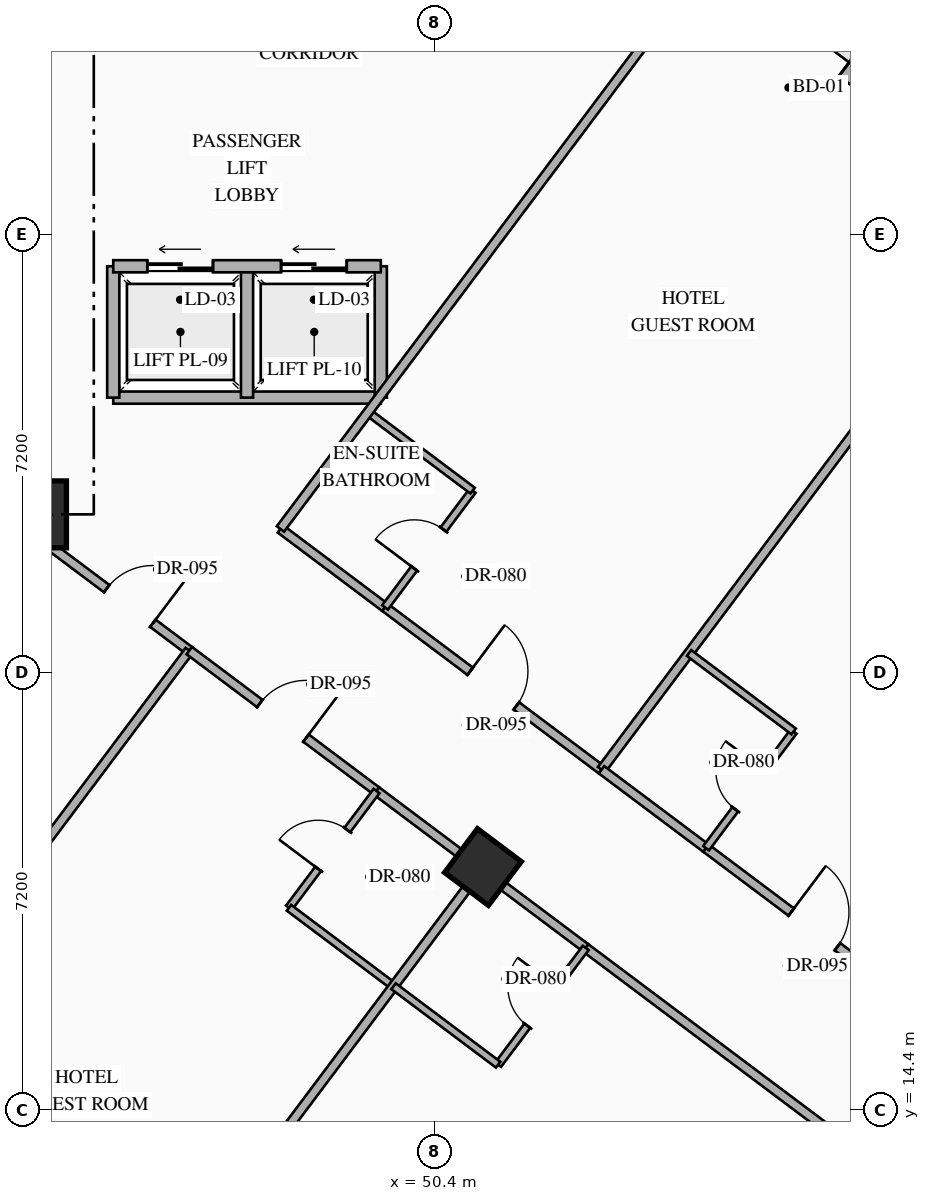
"""IFC4 building model, lengths in metres.
Left out: names, types, materials, properties, quantities, classifications, styles, units other than length and angle.
Written with IfcOpenShell. Run it as: python <this file> out.ifc"""

import sys

from ifc_helpers import new_model, si_unit, direction, frame, frame_2d, origin, origin_2d, place, context, subcontext, project, spatial, rectangle, hollow_rectangle, extrude, element, fill, save


model = new_model("IFC4")
c1 = context("Model", 3, precision=1e-05, world=origin(), true_north=direction((0.0, 1.0)))
c2 = subcontext(c1, "Body", "Model", "MODEL_VIEW")
j1 = project(units=[si_unit("LENGTHUNIT", "METRE"), si_unit("PLANEANGLEUNIT", "RADIAN")], contexts=[c1])
p1 = place(None, origin())
s1 = spatial("IfcSite", under=j1, at=p1, CompositionType="ELEMENT")
p2 = place(p1, origin())
s2 = spatial("IfcBuilding", under=s1, at=p2, CompositionType="ELEMENT")
p3 = place(p2, frame((0.0, 0.0, 84.65)))
s3 = spatial("IfcBuildingStorey", under=s2, at=p3, CompositionType="ELEMENT", Elevation=84.65)
p4 = place(p3, frame((43.8, 24.2, 0.0), z_axis=(0.0, 0.0, 1.0), x_axis=(1.0, 0.0, 0.0)))
e1 = element("IfcColumn", 1, at=p4, inside=s3, PredefinedType="COLUMN", context=c2, shape_type="SweptSolid", body=[
    extrude(rectangle(XDim=1.1, YDim=1.1, at=origin_2d()), origin(), (0.0, 0.0, 1.0), 3.35),
])
p5 = place(p3, frame((51.2, 18.4, 0.0), z_axis=(0.0, 0.0, 1.0), x_axis=(0.799999996291, -0.600000004945, 0.0)))
e2 = element("IfcColumn", 2, at=p5, inside=s3, PredefinedType="COLUMN", context=c2, shape_type="SweptSolid", body=[
    extrude(hollow_rectangle(XDim=0.9, YDim=0.9, WallThickness=0.036, at=origin_2d()), origin(), (0.0, 0.0, 1.0), 3.35),
])
p6 = place(p3, frame((44.86, 40.73, 0.0), z_axis=(0.0, 0.0, 1.0), x_axis=(0.800006902154, -0.599990797017, 0.0)))
e3 = element("IfcWall", 3, at=p6, inside=s3, PredefinedType="STANDARD", context=c2, shape_type="SweptSolid", body=[
    extrude(rectangle(XDim=29.712, YDim=0.28, at=frame_2d((14.856, 0.0))), origin(), (0.0, 0.0, 1.0), 3.13),
])
p7 = place(p6, frame((14.249, 0.0, 0.0)))
e4 = element("IfcOpeningElement", 4, at=p7, cuts=e3, PredefinedType="OPENING", context=c2, shape_type="SweptSolid", body=[
    extrude(rectangle(XDim=1.1, YDim=2.2, at=frame_2d((0.55, 1.1))), frame((0.0, 0.15, 0.0), z_axis=(0.0, -1.0, 0.0), x_axis=(1.0, 0.0, 0.0)), (0.0, 0.0, 1.0), 0.3),
])
p8 = place(p6, frame((1.612, 0.0, 0.85)))
e5 = element("IfcOpeningElement", 5, at=p8, cuts=e3, PredefinedType="OPENING", context=c2, shape_type="SweptSolid", body=[
    extrude(rectangle(XDim=1.4, YDim=1.8, at=frame_2d((0.7, 0.9))), frame((0.0, 0.15, 0.0), z_axis=(0.0, -1.0, 0.0), x_axis=(1.0, 0.0, 0.0)), (0.0, 0.0, 1.0), 0.3),
])
p9 = place(p6, frame((5.667, 0.0, 0.85)))
e6 = element("IfcOpeningElement", 6, at=p9, cuts=e3, PredefinedType="OPENING", context=c2, shape_type="SweptSolid", body=[
    extrude(rectangle(XDim=1.4, YDim=1.8, at=frame_2d((0.7, 0.9))), frame((0.0, 0.15, 0.0), z_axis=(0.0, -1.0, 0.0), x_axis=(1.0, 0.0, 0.0)), (0.0, 0.0, 1.0), 0.3),
])
p10 = place(p6, frame((9.912, 0.0, 0.85)))
e7 = element("IfcOpeningElement", 7, at=p10, cuts=e3, PredefinedType="OPENING", context=c2, shape_type="SweptSolid", body=[
    extrude(rectangle(XDim=1.4, YDim=1.8, at=frame_2d((0.7, 0.9))), frame((0.0, 0.15, 0.0), z_axis=(0.0, -1.0, 0.0), x_axis=(1.0, 0.0, 0.0)), (0.0, 0.0, 1.0), 0.3),
])
p11 = place(p6, frame((19.743, 0.0, 0.85)))
e8 = element("IfcOpeningElement", 8, at=p11, cuts=e3, PredefinedType="OPENING", context=c2, shape_type="SweptSolid", body=[
    extrude(rectangle(XDim=1.4, YDim=1.8, at=frame_2d((0.7, 0.9))), frame((0.0, 0.15, 0.0), z_axis=(0.0, -1.0, 0.0), x_axis=(1.0, 0.0, 0.0)), (0.0, 0.0, 1.0), 0.3),
])
p12 = place(p6, frame((22.645, 0.0, 0.85)))
e9 = element("IfcOpeningElement", 9, at=p12, cuts=e3, PredefinedType="OPENING", context=c2, shape_type="SweptSolid", body=[
    extrude(rectangle(XDim=1.4, YDim=1.8, at=frame_2d((0.7, 0.9))), frame((0.0, 0.15, 0.0), z_axis=(0.0, -1.0, 0.0), x_axis=(1.0, 0.0, 0.0)), (0.0, 0.0, 1.0), 0.3),
])
p13 = place(p6, frame((26.7, 0.0, 0.85)))
e10 = element("IfcOpeningElement", 10, at=p13, cuts=e3, PredefinedType="OPENING", context=c2, shape_type="SweptSolid", body=[
    extrude(rectangle(XDim=1.4, YDim=1.8, at=frame_2d((0.7, 0.9))), frame((0.0, 0.15, 0.0), z_axis=(0.0, -1.0, 0.0), x_axis=(1.0, 0.0, 0.0)), (0.0, 0.0, 1.0), 0.3),
])
p14 = place(p3, frame((45.12, 26.12, 0.0), z_axis=(0.0, 0.0, 1.0), x_axis=(1.0, 0.0, 0.0)))
e11 = element("IfcWall", 11, at=p14, inside=s3, PredefinedType="STANDARD", context=c2, shape_type="SweptSolid", body=[
    extrude(rectangle(XDim=4.4, YDim=0.2, at=frame_2d((2.2, 0.0))), origin(), (0.0, 0.0, 1.0), 3.13),
])
for number, where, z_axis, x_axis in (
    (12, (45.12, 26.12, 0.0), (0.0, 0.0, 1.0), (0.0, 1.0, 0.0)),
    (13, (49.52, 26.12, 0.0), (0.0, 0.0, 1.0), (0.0, 1.0, 0.0)),
    (14, (47.32, 26.12, 0.0), (0.0, 0.0, 1.0), (0.0, 1.0, 0.0)),
):
    element("IfcWall", number, at=place(p3, frame(where, z_axis=z_axis, x_axis=x_axis)), inside=s3, PredefinedType="STANDARD", context=c2, shape_type="SweptSolid", body=[
        extrude(rectangle(XDim=2.16, YDim=0.2, at=frame_2d((1.08, 0.0))), origin(), (0.0, 0.0, 1.0), 3.13),
    ])
p15 = place(p3, frame((45.12, 28.28, 0.0), z_axis=(0.0, 0.0, 1.0), x_axis=(1.0, 0.0, 0.0)))
e15 = element("IfcWall", 15, at=p15, inside=s3, PredefinedType="STANDARD", context=c2, shape_type="SweptSolid", body=[
    extrude(rectangle(XDim=4.4, YDim=0.2, at=frame_2d((2.2, 0.0))), origin(), (0.0, 0.0, 1.0), 3.13),
])
p16 = place(p15, frame((0.56, 0.0, 0.0)))
e16 = element("IfcOpeningElement", 16, at=p16, cuts=e15, PredefinedType="OPENING", context=c2, shape_type="SweptSolid", body=[
    extrude(rectangle(XDim=1.08, YDim=2.15, at=frame_2d((0.54, 1.075))), frame((0.0, 0.11, 0.0), z_axis=(0.0, -1.0, 0.0), x_axis=(1.0, 0.0, 0.0)), (0.0, 0.0, 1.0), 0.22),
])
p17 = place(p15, frame((2.76, 0.0, 0.0)))
e17 = element("IfcOpeningElement", 17, at=p17, cuts=e15, PredefinedType="OPENING", context=c2, shape_type="SweptSolid", body=[
    extrude(rectangle(XDim=1.08, YDim=2.15, at=frame_2d((0.54, 1.075))), frame((0.0, 0.11, 0.0), z_axis=(0.0, -1.0, 0.0), x_axis=(1.0, 0.0, 0.0)), (0.0, 0.0, 1.0), 0.22),
])
p18 = place(p3, frame((43.037, 24.46, 0.0), z_axis=(0.0, 0.0, 1.0), x_axis=(0.799971872363, -0.600037501685, 0.0)))
e18 = element("IfcWall", 18, at=p18, inside=s3, PredefinedType="PARTITIONING", context=c2, shape_type="SweptSolid", body=[
    extrude(rectangle(XDim=4.167, YDim=0.15, at=frame_2d((2.083, 0.0))), origin(), (0.0, 0.0, 1.0), 2.425),
])
p19 = place(p18, frame((2.468, 0.0, 0.0)))
e19 = element("IfcOpeningElement", 19, at=p19, cuts=e18, PredefinedType="OPENING", context=c2, shape_type="SweptSolid", body=[
    extrude(rectangle(XDim=0.95, YDim=2.15, at=frame_2d((0.475, 1.075))), frame((0.0, 0.085, 0.0), z_axis=(0.0, -1.0, 0.0), x_axis=(1.0, 0.0, 0.0)), (0.0, 0.0, 1.0), 0.17),
])
p20 = place(p3, frame((39.464, 12.752, 0.0), z_axis=(0.0, 0.0, 1.0), x_axis=(0.6, 0.8, 0.0)))
e20 = element("IfcWall", 20, at=p20, inside=s3, PredefinedType="PARTITIONING", context=c2, shape_type="SweptSolid", body=[
    extrude(rectangle(XDim=11.51, YDim=0.15, at=frame_2d((5.755, 0.0))), origin(), (0.0, 0.0, 1.0), 3.13),
])
p21 = place(p3, frame((47.87, 23.96, 0.0), z_axis=(0.0, 0.0, 1.0), x_axis=(0.79998637334, -0.60001816845, 0.0)))
e21 = element("IfcWall", 21, at=p21, inside=s3, PredefinedType="PARTITIONING", context=c2, shape_type="SweptSolid", body=[
    extrude(rectangle(XDim=2.15, YDim=0.15, at=frame_2d((1.075, 0.0))), origin(), (0.0, 0.0, 1.0), 2.775),
])
p22 = place(p3, frame((49.59, 22.67, 0.0), z_axis=(0.0, 0.0, 1.0), x_axis=(0.799993416095, -0.600008778439, 0.0)))
e22 = element("IfcWall", 22, at=p22, inside=s3, PredefinedType="PARTITIONING", context=c2, shape_type="SweptSolid", body=[
    extrude(rectangle(XDim=4.45, YDim=0.15, at=frame_2d((2.225, 0.0))), origin(), (0.0, 0.0, 1.0), 2.775),
])
p23 = place(p22, frame((1.75, 0.0, 0.0)))
e23 = element("IfcOpeningElement", 23, at=p23, cuts=e22, PredefinedType="OPENING", context=c2, shape_type="SweptSolid", body=[
    extrude(rectangle(XDim=0.95, YDim=2.15, at=frame_2d((0.475, 1.075))), frame((0.0, 0.085, 0.0), z_axis=(0.0, -1.0, 0.0), x_axis=(1.0, 0.0, 0.0)), (0.0, 0.0, 1.0), 0.17),
])
p24 = place(p3, frame((49.59, 22.67, 0.0), z_axis=(0.0, 0.0, 1.0), x_axis=(0.599951172744, 0.800036618114, 0.0)))
e24 = element("IfcWall", 24, at=p24, inside=s3, PredefinedType="PARTITIONING", context=c2, shape_type="SweptSolid", body=[
    extrude(rectangle(XDim=2.4, YDim=0.12, at=frame_2d((1.2, 0.0))), origin(), (0.0, 0.0, 1.0), 3.13),
])
p25 = place(p24, frame((0.8, 0.0, 0.0)))
e25 = element("IfcOpeningElement", 25, at=p25, cuts=e24, PredefinedType="OPENING", context=c2, shape_type="SweptSolid", body=[
    extrude(rectangle(XDim=0.8, YDim=2.06, at=frame_2d((0.4, 1.03))), frame((0.0, 0.07, 0.0), z_axis=(0.0, -1.0, 0.0), x_axis=(1.0, 0.0, 0.0)), (0.0, 0.0, 1.0), 0.14),
])
p26 = place(p3, frame((49.31, 25.88, 0.0), z_axis=(0.0, 0.0, 1.0), x_axis=(0.800040880289, -0.59994548908, 0.0)))
e26 = element("IfcWall", 26, at=p26, inside=s3, PredefinedType="PARTITIONING", context=c2, shape_type="SweptSolid", body=[
    extrude(rectangle(XDim=2.15, YDim=0.12, at=frame_2d((1.075, 0.0))), origin(), (0.0, 0.0, 1.0), 3.13),
])
for number, where, z_axis, x_axis in (
    (27, (47.87, 23.96, 0.0), (0.0, 0.0, 1.0), (0.6, 0.8, 0.0)),
    (28, (53.15, 20.0, 0.0), (0.0, 0.0, 1.0), (0.6, 0.8, 0.0)),
):
    element("IfcWall", number, at=place(p3, frame(where, z_axis=z_axis, x_axis=x_axis)), inside=s3, PredefinedType="PARTITIONING", context=c2, shape_type="SweptSolid", body=[
        extrude(rectangle(XDim=11.55, YDim=0.15, at=frame_2d((5.775, 0.0))), origin(), (0.0, 0.0, 1.0), 3.13),
    ])
p27 = place(p3, frame((53.15, 20.0, 0.0), z_axis=(0.0, 0.0, 1.0), x_axis=(0.800027249606, -0.599963665473, 0.0)))
e29 = element("IfcWall", 29, at=p27, inside=s3, PredefinedType="PARTITIONING", context=c2, shape_type="SweptSolid", body=[
    extrude(rectangle(XDim=2.15, YDim=0.15, at=frame_2d((1.075, 0.0))), origin(), (0.0, 0.0, 1.0), 2.775),
])
p28 = place(p3, frame((54.87, 18.71, 0.0), z_axis=(0.0, 0.0, 1.0), x_axis=(0.799993416095, -0.600008778439, 0.0)))
e30 = element("IfcWall", 30, at=p28, inside=s3, PredefinedType="PARTITIONING", context=c2, shape_type="SweptSolid", body=[
    extrude(rectangle(XDim=4.45, YDim=0.15, at=frame_2d((2.225, 0.0))), origin(), (0.0, 0.0, 1.0), 2.775),
])
p29 = place(p28, frame((1.75, 0.0, 0.0)))
e31 = element("IfcOpeningElement", 31, at=p29, cuts=e30, PredefinedType="OPENING", context=c2, shape_type="SweptSolid", body=[
    extrude(rectangle(XDim=0.95, YDim=2.15, at=frame_2d((0.475, 1.075))), frame((0.0, 0.085, 0.0), z_axis=(0.0, -1.0, 0.0), x_axis=(1.0, 0.0, 0.0)), (0.0, 0.0, 1.0), 0.17),
])
p30 = place(p3, frame((54.87, 18.71, 0.0), z_axis=(0.0, 0.0, 1.0), x_axis=(0.6, 0.8, 0.0)))
e32 = element("IfcWall", 32, at=p30, inside=s3, PredefinedType="PARTITIONING", context=c2, shape_type="SweptSolid", body=[
    extrude(rectangle(XDim=2.4, YDim=0.12, at=frame_2d((1.2, 0.0))), origin(), (0.0, 0.0, 1.0), 3.13),
])
p31 = place(p30, frame((0.8, 0.0, 0.0)))
e33 = element("IfcOpeningElement", 33, at=p31, cuts=e32, PredefinedType="OPENING", context=c2, shape_type="SweptSolid", body=[
    extrude(rectangle(XDim=0.8, YDim=2.06, at=frame_2d((0.4, 1.03))), frame((0.0, 0.07, 0.0), z_axis=(0.0, -1.0, 0.0), x_axis=(1.0, 0.0, 0.0)), (0.0, 0.0, 1.0), 0.14),
])
p32 = place(p3, frame((54.59, 21.92, 0.0), z_axis=(0.0, 0.0, 1.0), x_axis=(0.79998637334, -0.60001816845, 0.0)))
e34 = element("IfcWall", 34, at=p32, inside=s3, PredefinedType="PARTITIONING", context=c2, shape_type="SweptSolid", body=[
    extrude(rectangle(XDim=2.15, YDim=0.12, at=frame_2d((1.075, 0.0))), origin(), (0.0, 0.0, 1.0), 3.13),
])
p33 = place(p3, frame((46.37, 21.96, 0.0), z_axis=(0.0, 0.0, 1.0), x_axis=(0.799977170108, -0.600030438649, 0.0)))
e35 = element("IfcWall", 35, at=p33, inside=s3, PredefinedType="PARTITIONING", context=c2, shape_type="SweptSolid", body=[
    extrude(rectangle(XDim=3.85, YDim=0.15, at=frame_2d((1.925, 0.0))), origin(), (0.0, 0.0, 1.0), 2.425),
])
p34 = place(p33, frame((1.45, 0.0, 0.0)))
e36 = element("IfcOpeningElement", 36, at=p34, cuts=e35, PredefinedType="OPENING", context=c2, shape_type="SweptSolid", body=[
    extrude(rectangle(XDim=0.95, YDim=2.15, at=frame_2d((0.475, 1.075))), frame((0.0, 0.085, 0.0), z_axis=(0.0, -1.0, 0.0), x_axis=(1.0, 0.0, 0.0)), (0.0, 0.0, 1.0), 0.17),
])
p35 = place(p3, frame((49.45, 19.65, 0.0), z_axis=(0.0, 0.0, 1.0), x_axis=(0.800040880289, -0.59994548908, 0.0)))
e37 = element("IfcWall", 37, at=p35, inside=s3, PredefinedType="PARTITIONING", context=c2, shape_type="SweptSolid", body=[
    extrude(rectangle(XDim=2.15, YDim=0.15, at=frame_2d((1.075, 0.0))), origin(), (0.0, 0.0, 1.0), 2.425),
])
p36 = place(p3, frame((48.01, 17.73, 0.0), z_axis=(0.0, 0.0, 1.0), x_axis=(0.6, 0.8, 0.0)))
e38 = element("IfcWall", 38, at=p36, inside=s3, PredefinedType="PARTITIONING", context=c2, shape_type="SweptSolid", body=[
    extrude(rectangle(XDim=2.4, YDim=0.12, at=frame_2d((1.2, 0.0))), origin(), (0.0, 0.0, 1.0), 3.13),
])
p37 = place(p36, frame((0.8, 0.0, 0.0)))
e39 = element("IfcOpeningElement", 39, at=p37, cuts=e38, PredefinedType="OPENING", context=c2, shape_type="SweptSolid", body=[
    extrude(rectangle(XDim=0.8, YDim=2.06, at=frame_2d((0.4, 1.03))), frame((0.0, 0.07, 0.0), z_axis=(0.0, -1.0, 0.0), x_axis=(1.0, 0.0, 0.0)), (0.0, 0.0, 1.0), 0.14),
])
p38 = place(p3, frame((48.01, 17.73, 0.0), z_axis=(0.0, 0.0, 1.0), x_axis=(0.79998637334, -0.60001816845, 0.0)))
e40 = element("IfcWall", 40, at=p38, inside=s3, PredefinedType="PARTITIONING", context=c2, shape_type="SweptSolid", body=[
    extrude(rectangle(XDim=2.15, YDim=0.12, at=frame_2d((1.075, 0.0))), origin(), (0.0, 0.0, 1.0), 3.13),
])
p39 = place(p3, frame((44.36, 9.28, 0.0), z_axis=(0.0, 0.0, 1.0), x_axis=(0.599986233332, 0.800010324816, 0.0)))
e41 = element("IfcWall", 41, at=p39, inside=s3, PredefinedType="PARTITIONING", context=c2, shape_type="SweptSolid", body=[
    extrude(rectangle(XDim=11.35, YDim=0.15, at=frame_2d((5.675, 0.0))), origin(), (0.0, 0.0, 1.0), 2.425),
])
p40 = place(p3, frame((51.17, 18.36, 0.0), z_axis=(0.0, 0.0, 1.0), x_axis=(0.79998637334, -0.60001816845, 0.0)))
e42 = element("IfcWall", 42, at=p40, inside=s3, PredefinedType="PARTITIONING", context=c2, shape_type="SweptSolid", body=[
    extrude(rectangle(XDim=2.15, YDim=0.15, at=frame_2d((1.075, 0.0))), origin(), (0.0, 0.0, 1.0), 2.425),
])
p41 = place(p3, frame((52.89, 17.07, 0.0), z_axis=(0.0, 0.0, 1.0), x_axis=(0.8, -0.6, 0.0)))
e43 = element("IfcWall", 43, at=p41, inside=s3, PredefinedType="PARTITIONING", context=c2, shape_type="SweptSolid", body=[
    extrude(rectangle(XDim=11.51, YDim=0.15, at=frame_2d((5.755, 0.0))), origin(), (0.0, 0.0, 1.0), 2.425),
])
p42 = place(p41, frame((5.28, 0.0, 0.0)))
e44 = element("IfcOpeningElement", 44, at=p42, cuts=e43, PredefinedType="OPENING", context=c2, shape_type="SweptSolid", body=[
    extrude(rectangle(XDim=0.95, YDim=2.15, at=frame_2d((0.475, 1.075))), frame((0.0, 0.085, 0.0), z_axis=(0.0, -1.0, 0.0), x_axis=(1.0, 0.0, 0.0)), (0.0, 0.0, 1.0), 0.17),
])
p43 = place(p3, frame((51.45, 15.15, 0.0), z_axis=(0.0, 0.0, 1.0), x_axis=(0.599951172744, 0.800036618114, 0.0)))
e45 = element("IfcWall", 45, at=p43, inside=s3, PredefinedType="PARTITIONING", context=c2, shape_type="SweptSolid", body=[
    extrude(rectangle(XDim=2.4, YDim=0.12, at=frame_2d((1.2, 0.0))), origin(), (0.0, 0.0, 1.0), 3.13),
])
p44 = place(p43, frame((0.8, 0.0, 0.0)))
e46 = element("IfcOpeningElement", 46, at=p44, cuts=e45, PredefinedType="OPENING", context=c2, shape_type="SweptSolid", body=[
    extrude(rectangle(XDim=0.8, YDim=2.06, at=frame_2d((0.4, 1.03))), frame((0.0, 0.07, 0.0), z_axis=(0.0, -1.0, 0.0), x_axis=(1.0, 0.0, 0.0)), (0.0, 0.0, 1.0), 0.14),
])
p45 = place(p3, frame((49.73, 16.44, 0.0), z_axis=(0.0, 0.0, 1.0), x_axis=(0.79998637334, -0.60001816845, 0.0)))
e47 = element("IfcWall", 47, at=p45, inside=s3, PredefinedType="PARTITIONING", context=c2, shape_type="SweptSolid", body=[
    extrude(rectangle(XDim=2.15, YDim=0.12, at=frame_2d((1.075, 0.0))), origin(), (0.0, 0.0, 1.0), 3.13),
])
p46 = place(p7, origin())
e48 = element("IfcDoor", 48, at=p46, inside=s3, OperationType="SINGLE_SWING_LEFT", PredefinedType="DOOR", context=c2, shape_type="SweptSolid", body=[
    extrude(rectangle(XDim=1.1, YDim=2.2, at=frame_2d((0.55, 1.1))), frame((0.0, 0.025, 0.0), z_axis=(0.0, -1.0, 0.0), x_axis=(1.0, 0.0, 0.0)), (0.0, 0.0, 1.0), 0.05),
])
fill(e4, e48)
p47 = place(p16, origin())
e49 = element("IfcDoor", 49, at=p47, inside=s3, OperationType="SLIDING_TO_LEFT", PredefinedType="USERDEFINED", context=c2, shape_type="SweptSolid", body=[
    extrude(rectangle(XDim=1.08, YDim=2.15, at=frame_2d((0.54, 1.075))), frame((0.0, 0.025, 0.0), z_axis=(0.0, -1.0, 0.0), x_axis=(1.0, 0.0, 0.0)), (0.0, 0.0, 1.0), 0.05),
])
fill(e16, e49)
p48 = place(p17, origin())
e50 = element("IfcDoor", 50, at=p48, inside=s3, OperationType="SLIDING_TO_LEFT", PredefinedType="USERDEFINED", context=c2, shape_type="SweptSolid", body=[
    extrude(rectangle(XDim=1.08, YDim=2.15, at=frame_2d((0.54, 1.075))), frame((0.0, 0.025, 0.0), z_axis=(0.0, -1.0, 0.0), x_axis=(1.0, 0.0, 0.0)), (0.0, 0.0, 1.0), 0.05),
])
fill(e17, e50)
p49 = place(p19, origin())
e51 = element("IfcDoor", 51, at=p49, inside=s3, OperationType="SINGLE_SWING_RIGHT", PredefinedType="DOOR", context=c2, shape_type="SweptSolid", body=[
    extrude(rectangle(XDim=0.95, YDim=2.15, at=frame_2d((0.475, 1.075))), frame((0.0, 0.025, 0.0), z_axis=(0.0, -1.0, 0.0), x_axis=(1.0, 0.0, 0.0)), (0.0, 0.0, 1.0), 0.05),
])
fill(e19, e51)
p50 = place(p23, origin())
e52 = element("IfcDoor", 52, at=p50, inside=s3, OperationType="SINGLE_SWING_LEFT", PredefinedType="DOOR", context=c2, shape_type="SweptSolid", body=[
    extrude(rectangle(XDim=0.95, YDim=2.15, at=frame_2d((0.475, 1.075))), frame((0.0, 0.025, 0.0), z_axis=(0.0, -1.0, 0.0), x_axis=(1.0, 0.0, 0.0)), (0.0, 0.0, 1.0), 0.05),
])
fill(e23, e52)
p51 = place(p25, origin())
e53 = element("IfcDoor", 53, at=p51, inside=s3, OperationType="SINGLE_SWING_LEFT", PredefinedType="DOOR", context=c2, shape_type="SweptSolid", body=[
    extrude(rectangle(XDim=0.8, YDim=2.06, at=frame_2d((0.4, 1.03))), frame((0.0, 0.025, 0.0), z_axis=(0.0, -1.0, 0.0), x_axis=(1.0, 0.0, 0.0)), (0.0, 0.0, 1.0), 0.05),
])
fill(e25, e53)
p52 = place(p29, origin())
e54 = element("IfcDoor", 54, at=p52, inside=s3, OperationType="SINGLE_SWING_LEFT", PredefinedType="DOOR", context=c2, shape_type="SweptSolid", body=[
    extrude(rectangle(XDim=0.95, YDim=2.15, at=frame_2d((0.475, 1.075))), frame((0.0, 0.025, 0.0), z_axis=(0.0, -1.0, 0.0), x_axis=(1.0, 0.0, 0.0)), (0.0, 0.0, 1.0), 0.05),
])
fill(e31, e54)
p53 = place(p31, origin())
e55 = element("IfcDoor", 55, at=p53, inside=s3, OperationType="SINGLE_SWING_RIGHT", PredefinedType="DOOR", context=c2, shape_type="SweptSolid", body=[
    extrude(rectangle(XDim=0.8, YDim=2.06, at=frame_2d((0.4, 1.03))), frame((0.0, 0.025, 0.0), z_axis=(0.0, -1.0, 0.0), x_axis=(1.0, 0.0, 0.0)), (0.0, 0.0, 1.0), 0.05),
])
fill(e33, e55)
p54 = place(p34, origin())
e56 = element("IfcDoor", 56, at=p54, inside=s3, OperationType="SINGLE_SWING_RIGHT", PredefinedType="DOOR", context=c2, shape_type="SweptSolid", body=[
    extrude(rectangle(XDim=0.95, YDim=2.15, at=frame_2d((0.475, 1.075))), frame((0.0, 0.025, 0.0), z_axis=(0.0, -1.0, 0.0), x_axis=(1.0, 0.0, 0.0)), (0.0, 0.0, 1.0), 0.05),
])
fill(e36, e56)
p55 = place(p37, origin())
e57 = element("IfcDoor", 57, at=p55, inside=s3, OperationType="SINGLE_SWING_LEFT", PredefinedType="DOOR", context=c2, shape_type="SweptSolid", body=[
    extrude(rectangle(XDim=0.8, YDim=2.06, at=frame_2d((0.4, 1.03))), frame((0.0, 0.025, 0.0), z_axis=(0.0, -1.0, 0.0), x_axis=(1.0, 0.0, 0.0)), (0.0, 0.0, 1.0), 0.05),
])
fill(e39, e57)
p56 = place(p44, origin())
e58 = element("IfcDoor", 58, at=p56, inside=s3, OperationType="SINGLE_SWING_RIGHT", PredefinedType="DOOR", context=c2, shape_type="SweptSolid", body=[
    extrude(rectangle(XDim=0.8, YDim=2.06, at=frame_2d((0.4, 1.03))), frame((0.0, 0.025, 0.0), z_axis=(0.0, -1.0, 0.0), x_axis=(1.0, 0.0, 0.0)), (0.0, 0.0, 1.0), 0.05),
])
fill(e46, e58)
save(model, sys.argv[1])
